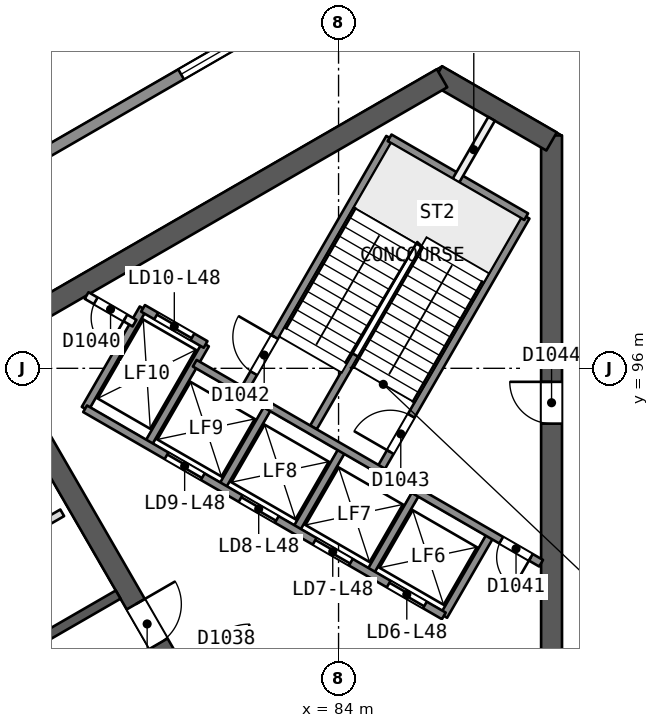
"""IFC4 building model, lengths in metres.
Left out: names, types, materials, properties, quantities, classifications, styles, units other than length and angle.
Written with IfcOpenShell. Run it as: python <this file> out.ifc"""

import sys

from ifc_helpers import new_model, si_unit, direction, frame, frame_2d, origin, place, context, subcontext, project, spatial, rectangle, extrude, element, fill, save


model = new_model("IFC4")
c1 = context("Model", 3, precision=1e-05, world=origin(), true_north=direction((0.0, 1.0)))
c2 = subcontext(c1, "Body", "Model", "MODEL_VIEW")
j1 = project(units=[si_unit("LENGTHUNIT", "METRE"), si_unit("PLANEANGLEUNIT", "RADIAN")], contexts=[c1])
p1 = place(None, origin())
s1 = spatial("IfcSite", under=j1, at=p1, CompositionType="ELEMENT")
p2 = place(p1, origin())
s2 = spatial("IfcBuilding", under=s1, at=p2, CompositionType="ELEMENT")
p3 = place(p2, frame((0.0, 0.0, 197.0)))
s3 = spatial("IfcBuildingStorey", under=s2, at=p3, CompositionType="ELEMENT", Elevation=197.0)
p4 = place(p3, frame((89.605, 88.069, 0.0), z_axis=(0.0, 0.0, 1.0), x_axis=(0.0, 1.0, 0.0)))
e1 = element("IfcWall", 1, at=p4, inside=s3, PredefinedType="SHEAR", context=c2, shape_type="SweptSolid", body=[
    extrude(rectangle(XDim=14.058, YDim=0.55, at=frame_2d((7.029, 0.0))), origin(), (0.0, 0.0, 1.0), 4.4),
])
p5 = place(p4, frame((6.475, 0.0, 0.0)))
e2 = element("IfcOpeningElement", 2, at=p5, cuts=e1, PredefinedType="OPENING", context=c2, shape_type="SweptSolid", body=[
    extrude(rectangle(XDim=1.1, YDim=2.1, at=frame_2d((0.55, 1.05))), frame((0.0, 0.286, 0.0), z_axis=(0.0, -1.0, 0.0), x_axis=(1.0, 0.0, 0.0)), (0.0, 0.0, 1.0), 0.571),
])
p6 = place(p3, frame((89.605, 101.969, 0.0), z_axis=(0.0, 0.0, 1.0), x_axis=(-0.865997833373, 0.500047750313, 0.0)))
e3 = element("IfcWall", 3, at=p6, inside=s3, PredefinedType="SHEAR", context=c2, shape_type="SweptSolid", body=[
    extrude(rectangle(XDim=3.487, YDim=0.55, at=frame_2d((1.743, 0.0))), origin(), (0.0, 0.0, 1.0), 4.4),
])
p7 = place(p3, frame((86.723, 103.633, 0.0), z_axis=(0.0, 0.0, 1.0), x_axis=(-0.866023530946, -0.500003243837, 0.0)))
e4 = element("IfcWall", 4, at=p7, inside=s3, PredefinedType="SHEAR", context=c2, shape_type="SweptSolid", body=[
    extrude(rectangle(XDim=14.175, YDim=0.55, at=frame_2d((7.087, 0.0))), origin(), (0.0, 0.0, 1.0), 4.4),
])
p8 = place(p3, frame((74.686, 96.683, 0.0), z_axis=(0.0, 0.0, 1.0), x_axis=(0.499997818338, -0.866026663364, 0.0)))
e5 = element("IfcWall", 5, at=p8, inside=s3, PredefinedType="SHEAR", context=c2, shape_type="SweptSolid", body=[
    extrude(rectangle(XDim=10.105, YDim=0.55, at=frame_2d((5.052, 0.0))), origin(), (0.0, 0.0, 1.0), 4.4),
])
p9 = place(p8, frame((7.955, 0.0, 0.0)))
e6 = element("IfcOpeningElement", 6, at=p9, cuts=e5, PredefinedType="OPENING", context=c2, shape_type="SweptSolid", body=[
    extrude(rectangle(XDim=1.2, YDim=2.1, at=frame_2d((0.6, 1.05))), frame((0.0, 0.286, 0.0), z_axis=(0.0, -1.0, 0.0), x_axis=(1.0, 0.0, 0.0)), (0.0, 0.0, 1.0), 0.571),
])
p10 = place(p3, frame((78.2, 90.046, 0.0), z_axis=(0.0, 0.0, 1.0), x_axis=(-0.866026492143, -0.499998114903, 0.0)))
e7 = element("IfcWall", 7, at=p10, inside=s3, PredefinedType="SHEAR", context=c2, shape_type="SweptSolid", body=[
    extrude(rectangle(XDim=15.588, YDim=0.25, at=frame_2d((7.794, 0.0))), origin(), (0.0, 0.0, 1.0), 3.95),
])
p11 = place(p10, frame((2.518, 0.0, 0.0)))
e8 = element("IfcOpeningElement", 8, at=p11, cuts=e7, PredefinedType="OPENING", context=c2, shape_type="SweptSolid", body=[
    extrude(rectangle(XDim=1.2, YDim=2.4, at=frame_2d((0.6, 1.2))), frame((0.0, 0.135, 0.0), z_axis=(0.0, -1.0, 0.0), x_axis=(1.0, 0.0, 0.0)), (0.0, 0.0, 1.0), 0.271),
])
p12 = place(p10, frame((7.194, 0.0, 0.0)))
e9 = element("IfcOpeningElement", 9, at=p12, cuts=e7, PredefinedType="OPENING", context=c2, shape_type="SweptSolid", body=[
    extrude(rectangle(XDim=1.2, YDim=2.4, at=frame_2d((0.6, 1.2))), frame((0.0, 0.135, 0.0), z_axis=(0.0, -1.0, 0.0), x_axis=(1.0, 0.0, 0.0)), (0.0, 0.0, 1.0), 0.271),
])
p13 = place(p10, frame((10.312, 0.0, 0.0)))
e10 = element("IfcOpeningElement", 10, at=p13, cuts=e7, PredefinedType="OPENING", context=c2, shape_type="SweptSolid", body=[
    extrude(rectangle(XDim=1.2, YDim=2.4, at=frame_2d((0.6, 1.2))), frame((0.0, 0.135, 0.0), z_axis=(0.0, -1.0, 0.0), x_axis=(1.0, 0.0, 0.0)), (0.0, 0.0, 1.0), 0.271),
])
p14 = place(p10, frame((13.43, 0.0, 0.0)))
e11 = element("IfcOpeningElement", 11, at=p14, cuts=e7, PredefinedType="OPENING", context=c2, shape_type="SweptSolid", body=[
    extrude(rectangle(XDim=1.2, YDim=2.4, at=frame_2d((0.6, 1.2))), frame((0.0, 0.135, 0.0), z_axis=(0.0, -1.0, 0.0), x_axis=(1.0, 0.0, 0.0)), (0.0, 0.0, 1.0), 0.271),
])
p15 = place(p3, frame((76.728, 92.198, 0.0), z_axis=(0.0, 0.0, 1.0), x_axis=(-0.866029326177, -0.499993206155, 0.0)))
e12 = element("IfcWall", 12, at=p15, inside=s3, PredefinedType="PARTITIONING", context=c2, shape_type="SweptSolid", body=[
    extrude(rectangle(XDim=6.036, YDim=0.2, at=frame_2d((3.018, 0.0))), origin(), (0.0, 0.0, 1.0), 3.95),
])
p16 = place(p15, frame((2.418, 0.0, 0.0)))
e13 = element("IfcOpeningElement", 13, at=p16, cuts=e12, PredefinedType="OPENING", context=c2, shape_type="SweptSolid", body=[
    extrude(rectangle(XDim=1.2, YDim=2.4, at=frame_2d((0.6, 1.2))), frame((0.0, 0.11, 0.0), z_axis=(0.0, -1.0, 0.0), x_axis=(1.0, 0.0, 0.0)), (0.0, 0.0, 1.0), 0.221),
])
p17 = place(p3, frame((43.362, 82.667, 0.0), z_axis=(0.0, 0.0, 1.0), x_axis=(0.866025243948, 0.500000276845, 0.0)))
e14 = element("IfcWall", 14, at=p17, inside=s3, PredefinedType="SOLIDWALL", context=c2, shape_type="SweptSolid", body=[
    extrude(rectangle(XDim=52.132, YDim=0.3, at=frame_2d((26.066, 0.0))), origin(), (0.0, 0.0, 1.0), 3.95),
])
p18 = place(p17, frame((8.193, 0.0, 0.9)))
e15 = element("IfcOpeningElement", 15, at=p18, cuts=e14, PredefinedType="OPENING", context=c2, shape_type="SweptSolid", body=[
    extrude(rectangle(XDim=1.8, YDim=1.5, at=frame_2d((0.9, 0.75))), frame((0.0, 0.161, 0.0), z_axis=(0.0, -1.0, 0.0), x_axis=(1.0, 0.0, 0.0)), (0.0, 0.0, 1.0), 0.321),
])
p19 = place(p17, frame((42.139, 0.0, 0.9)))
e16 = element("IfcOpeningElement", 16, at=p19, cuts=e14, PredefinedType="OPENING", context=c2, shape_type="SweptSolid", body=[
    extrude(rectangle(XDim=1.8, YDim=1.5, at=frame_2d((0.9, 0.75))), frame((0.0, 0.161, 0.0), z_axis=(0.0, -1.0, 0.0), x_axis=(1.0, 0.0, 0.0)), (0.0, 0.0, 1.0), 0.321),
])
p20 = place(p17, frame((3.713, 0.0, 0.6)))
e17 = element("IfcOpeningElement", 17, at=p20, cuts=e14, PredefinedType="OPENING", context=c2, shape_type="SweptSolid", body=[
    extrude(rectangle(XDim=3.0, YDim=2.4, at=frame_2d((1.5, 1.2))), frame((0.0, 0.161, 0.0), z_axis=(0.0, -1.0, 0.0), x_axis=(1.0, 0.0, 0.0)), (0.0, 0.0, 1.0), 0.321),
])
p21 = place(p17, frame((14.14, 0.0, 0.6)))
e18 = element("IfcOpeningElement", 18, at=p21, cuts=e14, PredefinedType="OPENING", context=c2, shape_type="SweptSolid", body=[
    extrude(rectangle(XDim=3.0, YDim=2.4, at=frame_2d((1.5, 1.2))), frame((0.0, 0.161, 0.0), z_axis=(0.0, -1.0, 0.0), x_axis=(1.0, 0.0, 0.0)), (0.0, 0.0, 1.0), 0.321),
])
p22 = place(p17, frame((24.566, 0.0, 0.6)))
e19 = element("IfcOpeningElement", 19, at=p22, cuts=e14, PredefinedType="OPENING", context=c2, shape_type="SweptSolid", body=[
    extrude(rectangle(XDim=3.0, YDim=2.4, at=frame_2d((1.5, 1.2))), frame((0.0, 0.161, 0.0), z_axis=(0.0, -1.0, 0.0), x_axis=(1.0, 0.0, 0.0)), (0.0, 0.0, 1.0), 0.321),
])
p23 = place(p17, frame((34.992, 0.0, 0.6)))
e20 = element("IfcOpeningElement", 20, at=p23, cuts=e14, PredefinedType="OPENING", context=c2, shape_type="SweptSolid", body=[
    extrude(rectangle(XDim=3.0, YDim=2.4, at=frame_2d((1.5, 1.2))), frame((0.0, 0.161, 0.0), z_axis=(0.0, -1.0, 0.0), x_axis=(1.0, 0.0, 0.0)), (0.0, 0.0, 1.0), 0.321),
])
p24 = place(p17, frame((45.419, 0.0, 0.6)))
e21 = element("IfcOpeningElement", 21, at=p24, cuts=e14, PredefinedType="OPENING", context=c2, shape_type="SweptSolid", body=[
    extrude(rectangle(XDim=3.0, YDim=2.4, at=frame_2d((1.5, 1.2))), frame((0.0, 0.161, 0.0), z_axis=(0.0, -1.0, 0.0), x_axis=(1.0, 0.0, 0.0)), (0.0, 0.0, 1.0), 0.321),
])
for number, where, z_axis, x_axis in (
    (22, (86.77, 89.486, 0.0), (0.0, 0.0, 1.0), (0.5, 0.866, 0.0)),
    (23, (84.821, 90.611, 0.0), (0.0, 0.0, 1.0), (0.5, 0.866, 0.0)),
):
    element("IfcWall", number, at=place(p3, frame(where, z_axis=z_axis, x_axis=x_axis)), inside=s3, PredefinedType="SOLIDWALL", context=c2, shape_type="SweptSolid", body=[
        extrude(rectangle(XDim=2.48, YDim=0.2, at=frame_2d((1.24, 0.0))), origin(), (0.0, 0.0, 1.0), 3.95),
    ])
p25 = place(p3, frame((85.087, 93.321, 0.0), z_axis=(0.0, 0.0, 1.0), x_axis=(0.500019787375, 0.866013979237, 0.0)))
e24 = element("IfcWall", 24, at=p25, inside=s3, PredefinedType="SOLIDWALL", context=c2, shape_type="SweptSolid", body=[
    extrude(rectangle(XDim=7.7, YDim=0.2, at=frame_2d((3.85, 0.0))), origin(), (0.0, 0.0, 1.0), 3.95),
])
p26 = place(p25, frame((0.55, 0.0, 0.0)))
e25 = element("IfcOpeningElement", 25, at=p26, cuts=e24, PredefinedType="OPENING", context=c2, shape_type="SweptSolid", body=[
    extrude(rectangle(XDim=1.1, YDim=2.1, at=frame_2d((0.55, 1.05))), frame((0.0, 0.11, 0.0), z_axis=(0.0, -1.0, 0.0), x_axis=(1.0, 0.0, 0.0)), (0.0, 0.0, 1.0), 0.221),
])
p27 = place(p3, frame((82.873, 91.736, 0.0), z_axis=(0.0, 0.0, 1.0), x_axis=(0.499961042966, 0.86604789447, 0.0)))
e26 = element("IfcWall", 26, at=p27, inside=s3, PredefinedType="SOLIDWALL", context=c2, shape_type="SweptSolid", body=[
    extrude(rectangle(XDim=2.48, YDim=0.2, at=frame_2d((1.24, 0.0))), origin(), (0.0, 0.0, 1.0), 3.95),
])
p28 = place(p3, frame((83.34, 94.445, 0.0), z_axis=(0.0, 0.0, 1.0), x_axis=(0.499946605688, 0.86605622881, 0.0)))
e27 = element("IfcWall", 27, at=p28, inside=s3, PredefinedType="SOLIDWALL", context=c2, shape_type="SweptSolid", body=[
    extrude(rectangle(XDim=2.2, YDim=0.2, at=frame_2d((1.1, 0.0))), origin(), (0.0, 0.0, 1.0), 3.95),
])
p29 = place(p3, frame((87.09, 100.94, 0.0), z_axis=(0.0, 0.0, 1.0), x_axis=(0.499951854219, 0.86605319898, 0.0)))
e28 = element("IfcWall", 28, at=p29, inside=s3, PredefinedType="PARTITIONING", context=c2, shape_type="SweptSolid", body=[
    extrude(rectangle(XDim=1.873, YDim=0.2, at=frame_2d((0.937, 0.0))), origin(), (0.0, 0.0, 1.0), 3.95),
])
p30 = place(p3, frame((80.924, 92.861, 0.0), z_axis=(0.0, 0.0, 1.0), x_axis=(0.499961042966, 0.86604789447, 0.0)))
e29 = element("IfcWall", 29, at=p30, inside=s3, PredefinedType="SOLIDWALL", context=c2, shape_type="SweptSolid", body=[
    extrude(rectangle(XDim=2.48, YDim=0.2, at=frame_2d((1.24, 0.0))), origin(), (0.0, 0.0, 1.0), 3.95),
])
p31 = place(p3, frame((81.493, 95.396, 0.0), z_axis=(0.0, 0.0, 1.0), x_axis=(0.500006057782, 0.866021906294, 0.0)))
e30 = element("IfcWall", 30, at=p31, inside=s3, PredefinedType="SOLIDWALL", context=c2, shape_type="SweptSolid", body=[
    extrude(rectangle(XDim=7.7, YDim=0.2, at=frame_2d((3.85, 0.0))), origin(), (0.0, 0.0, 1.0), 3.95),
])
p32 = place(p31, frame((0.55, 0.0, 0.0)))
e31 = element("IfcOpeningElement", 31, at=p32, cuts=e30, PredefinedType="OPENING", context=c2, shape_type="SweptSolid", body=[
    extrude(rectangle(XDim=1.1, YDim=2.1, at=frame_2d((0.55, 1.05))), frame((0.0, 0.11, 0.0), z_axis=(0.0, -1.0, 0.0), x_axis=(1.0, 0.0, 0.0)), (0.0, 0.0, 1.0), 0.221),
])
for number, where, z_axis, x_axis in (
    (32, (78.976, 93.986, 0.0), (0.0, 0.0, 1.0), (0.5, 0.866, 0.0)),
    (33, (77.33, 94.936, 0.0), (0.0, 0.0, 1.0), (0.5, 0.866, 0.0)),
):
    element("IfcWall", number, at=place(p3, frame(where, z_axis=z_axis, x_axis=x_axis)), inside=s3, PredefinedType="SOLIDWALL", context=c2, shape_type="SweptSolid", body=[
        extrude(rectangle(XDim=3.05, YDim=0.2, at=frame_2d((1.525, 0.0))), origin(), (0.0, 0.0, 1.0), 3.95),
    ])
p33 = place(p3, frame((86.77, 89.486, 0.0), z_axis=(0.0, 0.0, 1.0), x_axis=(-0.86601811187, 0.500012629753, 0.0)))
e34 = element("IfcWall", 34, at=p33, inside=s3, PredefinedType="SOLIDWALL", context=c2, shape_type="SweptSolid", body=[
    extrude(rectangle(XDim=10.9, YDim=0.2, at=frame_2d((5.45, 0.0))), origin(), (0.0, 0.0, 1.0), 3.95),
])
p34 = place(p33, frame((0.575, 0.0, 0.0)))
e35 = element("IfcOpeningElement", 35, at=p34, cuts=e34, PredefinedType="OPENING", context=c2, shape_type="SweptSolid", body=[
    extrude(rectangle(XDim=1.1, YDim=2.1, at=frame_2d((0.55, 1.05))), frame((0.0, 0.11, 0.0), z_axis=(0.0, -1.0, 0.0), x_axis=(1.0, 0.0, 0.0)), (0.0, 0.0, 1.0), 0.221),
])
p35 = place(p33, frame((2.825, 0.0, 0.0)))
e36 = element("IfcOpeningElement", 36, at=p35, cuts=e34, PredefinedType="OPENING", context=c2, shape_type="SweptSolid", body=[
    extrude(rectangle(XDim=1.1, YDim=2.1, at=frame_2d((0.55, 1.05))), frame((0.0, 0.11, 0.0), z_axis=(0.0, -1.0, 0.0), x_axis=(1.0, 0.0, 0.0)), (0.0, 0.0, 1.0), 0.221),
])
p36 = place(p33, frame((5.075, 0.0, 0.0)))
e37 = element("IfcOpeningElement", 37, at=p36, cuts=e34, PredefinedType="OPENING", context=c2, shape_type="SweptSolid", body=[
    extrude(rectangle(XDim=1.1, YDim=2.1, at=frame_2d((0.55, 1.05))), frame((0.0, 0.11, 0.0), z_axis=(0.0, -1.0, 0.0), x_axis=(1.0, 0.0, 0.0)), (0.0, 0.0, 1.0), 0.221),
])
p37 = place(p33, frame((7.325, 0.0, 0.0)))
e38 = element("IfcOpeningElement", 38, at=p37, cuts=e34, PredefinedType="OPENING", context=c2, shape_type="SweptSolid", body=[
    extrude(rectangle(XDim=1.1, YDim=2.1, at=frame_2d((0.55, 1.05))), frame((0.0, 0.11, 0.0), z_axis=(0.0, -1.0, 0.0), x_axis=(1.0, 0.0, 0.0)), (0.0, 0.0, 1.0), 0.221),
])
p38 = place(p3, frame((89.33, 90.872, 0.0), z_axis=(0.0, 0.0, 1.0), x_axis=(-0.866027589512, 0.49999621419, 0.0)))
e39 = element("IfcWall", 39, at=p38, inside=s3, PredefinedType="SOLIDWALL", context=c2, shape_type="SweptSolid", body=[
    extrude(rectangle(XDim=10.524, YDim=0.2, at=frame_2d((5.262, 0.0))), origin(), (0.0, 0.0, 1.0), 3.95),
])
p39 = place(p38, frame((0.312, 0.0, 0.0)))
e40 = element("IfcOpeningElement", 40, at=p39, cuts=e39, PredefinedType="OPENING", context=c2, shape_type="SweptSolid", body=[
    extrude(rectangle(XDim=0.9, YDim=2.1, at=frame_2d((0.45, 1.05))), frame((0.0, 0.11, 0.0), z_axis=(0.0, -1.0, 0.0), x_axis=(1.0, 0.0, 0.0)), (0.0, 0.0, 1.0), 0.221),
])
p40 = place(p3, frame((78.63, 97.188, 0.0), z_axis=(0.0, 0.0, 1.0), x_axis=(-0.866003949776, 0.500037157592, 0.0)))
e41 = element("IfcWall", 41, at=p40, inside=s3, PredefinedType="PARTITIONING", context=c2, shape_type="SweptSolid", body=[
    extrude(rectangle(XDim=1.455, YDim=0.2, at=frame_2d((0.728, 0.0))), origin(), (0.0, 0.0, 1.0), 3.95),
])
p41 = place(p40, frame((0.278, 0.0, 0.0)))
e42 = element("IfcOpeningElement", 42, at=p41, cuts=e41, PredefinedType="OPENING", context=c2, shape_type="SweptSolid", body=[
    extrude(rectangle(XDim=0.9, YDim=2.1, at=frame_2d((0.45, 1.05))), frame((0.0, 0.11, 0.0), z_axis=(0.0, -1.0, 0.0), x_axis=(1.0, 0.0, 0.0)), (0.0, 0.0, 1.0), 0.221),
])
p42 = place(p3, frame((80.5, 96.627, 0.0), z_axis=(0.0, 0.0, 1.0), x_axis=(-0.86601224135, 0.500022797313, 0.0)))
e43 = element("IfcWall", 43, at=p42, inside=s3, PredefinedType="SOLIDWALL", context=c2, shape_type="SweptSolid", body=[
    extrude(rectangle(XDim=1.9, YDim=0.2, at=frame_2d((0.95, 0.0))), origin(), (0.0, 0.0, 1.0), 3.95),
])
p43 = place(p42, frame((0.4, 0.0, 0.0)))
e44 = element("IfcOpeningElement", 44, at=p43, cuts=e43, PredefinedType="OPENING", context=c2, shape_type="SweptSolid", body=[
    extrude(rectangle(XDim=1.1, YDim=2.1, at=frame_2d((0.55, 1.05))), frame((0.0, 0.11, 0.0), z_axis=(0.0, -1.0, 0.0), x_axis=(1.0, 0.0, 0.0)), (0.0, 0.0, 1.0), 0.221),
])
p44 = place(p3, frame((88.937, 99.99, 0.0), z_axis=(0.0, 0.0, 1.0), x_axis=(-0.866004344652, 0.500036473714, 0.0)))
e45 = element("IfcWall", 45, at=p44, inside=s3, PredefinedType="SOLIDWALL", context=c2, shape_type="SweptSolid", body=[
    extrude(rectangle(XDim=4.15, YDim=0.2, at=frame_2d((2.075, 0.0))), origin(), (0.0, 0.0, 1.0), 3.95),
])
p45 = place(p19, origin())
e46 = element("IfcWindow", 46, at=p45, inside=s3, PartitioningType="SINGLE_PANEL", PredefinedType="WINDOW", context=c2, shape_type="SweptSolid", body=[
    extrude(rectangle(XDim=1.8, YDim=1.5, at=frame_2d((0.9, 0.75))), frame((0.0, 0.03, 0.0), z_axis=(0.0, -1.0, 0.0), x_axis=(1.0, 0.0, 0.0)), (0.0, 0.0, 1.0), 0.06),
])
fill(e16, e46)
p46 = place(p9, origin())
e47 = element("IfcDoor", 47, at=p46, inside=s3, OperationType="SINGLE_SWING_LEFT", PredefinedType="NOTDEFINED", context=c2, shape_type="SweptSolid", body=[
    extrude(rectangle(XDim=1.2, YDim=2.1, at=frame_2d((0.6, 1.05))), frame((0.0, 0.025, 0.0), z_axis=(0.0, -1.0, 0.0), x_axis=(1.0, 0.0, 0.0)), (0.0, 0.0, 1.0), 0.05),
])
fill(e6, e47)
p47 = place(p34, origin())
e48 = element("IfcDoor", 48, at=p47, inside=s3, OperationType="SLIDING_TO_RIGHT", PredefinedType="NOTDEFINED", context=c2, shape_type="SweptSolid", body=[
    extrude(rectangle(XDim=1.1, YDim=2.1, at=frame_2d((0.55, 1.05))), frame((0.0, 0.025, 0.0), z_axis=(0.0, -1.0, 0.0), x_axis=(1.0, 0.0, 0.0)), (0.0, 0.0, 1.0), 0.05),
])
fill(e35, e48)
p48 = place(p35, origin())
e49 = element("IfcDoor", 49, at=p48, inside=s3, OperationType="SLIDING_TO_LEFT", PredefinedType="NOTDEFINED", context=c2, shape_type="SweptSolid", body=[
    extrude(rectangle(XDim=1.1, YDim=2.1, at=frame_2d((0.55, 1.05))), frame((0.0, 0.025, 0.0), z_axis=(0.0, -1.0, 0.0), x_axis=(1.0, 0.0, 0.0)), (0.0, 0.0, 1.0), 0.05),
])
fill(e36, e49)
p49 = place(p36, origin())
e50 = element("IfcDoor", 50, at=p49, inside=s3, OperationType="SLIDING_TO_RIGHT", PredefinedType="NOTDEFINED", context=c2, shape_type="SweptSolid", body=[
    extrude(rectangle(XDim=1.1, YDim=2.1, at=frame_2d((0.55, 1.05))), frame((0.0, 0.025, 0.0), z_axis=(0.0, -1.0, 0.0), x_axis=(1.0, 0.0, 0.0)), (0.0, 0.0, 1.0), 0.05),
])
fill(e37, e50)
p50 = place(p37, origin())
e51 = element("IfcDoor", 51, at=p50, inside=s3, OperationType="SLIDING_TO_LEFT", PredefinedType="NOTDEFINED", context=c2, shape_type="SweptSolid", body=[
    extrude(rectangle(XDim=1.1, YDim=2.1, at=frame_2d((0.55, 1.05))), frame((0.0, 0.025, 0.0), z_axis=(0.0, -1.0, 0.0), x_axis=(1.0, 0.0, 0.0)), (0.0, 0.0, 1.0), 0.05),
])
fill(e38, e51)
p51 = place(p43, origin())
e52 = element("IfcDoor", 52, at=p51, inside=s3, OperationType="SLIDING_TO_RIGHT", PredefinedType="NOTDEFINED", context=c2, shape_type="SweptSolid", body=[
    extrude(rectangle(XDim=1.1, YDim=2.1, at=frame_2d((0.55, 1.05))), frame((0.0, 0.025, 0.0), z_axis=(0.0, -1.0, 0.0), x_axis=(1.0, 0.0, 0.0)), (0.0, 0.0, 1.0), 0.05),
])
fill(e44, e52)
p52 = place(p41, origin())
e53 = element("IfcDoor", 53, at=p52, inside=s3, OperationType="SINGLE_SWING_LEFT", PredefinedType="NOTDEFINED", context=c2, shape_type="SweptSolid", body=[
    extrude(rectangle(XDim=0.9, YDim=2.1, at=frame_2d((0.45, 1.05))), frame((0.0, 0.025, 0.0), z_axis=(0.0, -1.0, 0.0), x_axis=(1.0, 0.0, 0.0)), (0.0, 0.0, 1.0), 0.05),
])
fill(e42, e53)
p53 = place(p39, origin())
e54 = element("IfcDoor", 54, at=p53, inside=s3, OperationType="SINGLE_SWING_LEFT", PredefinedType="NOTDEFINED", context=c2, shape_type="SweptSolid", body=[
    extrude(rectangle(XDim=0.9, YDim=2.1, at=frame_2d((0.45, 1.05))), frame((0.0, 0.025, 0.0), z_axis=(0.0, -1.0, 0.0), x_axis=(1.0, 0.0, 0.0)), (0.0, 0.0, 1.0), 0.05),
])
fill(e40, e54)
p54 = place(p32, origin())
e55 = element("IfcDoor", 55, at=p54, inside=s3, OperationType="SINGLE_SWING_RIGHT", PredefinedType="NOTDEFINED", context=c2, shape_type="SweptSolid", body=[
    extrude(rectangle(XDim=1.1, YDim=2.1, at=frame_2d((0.55, 1.05))), frame((0.0, 0.025, 0.0), z_axis=(0.0, -1.0, 0.0), x_axis=(1.0, 0.0, 0.0)), (0.0, 0.0, 1.0), 0.05),
])
fill(e31, e55)
p55 = place(p26, origin())
e56 = element("IfcDoor", 56, at=p55, inside=s3, OperationType="SINGLE_SWING_LEFT", PredefinedType="NOTDEFINED", context=c2, shape_type="SweptSolid", body=[
    extrude(rectangle(XDim=1.1, YDim=2.1, at=frame_2d((0.55, 1.05))), frame((0.0, 0.025, 0.0), z_axis=(0.0, -1.0, 0.0), x_axis=(1.0, 0.0, 0.0)), (0.0, 0.0, 1.0), 0.05),
])
fill(e25, e56)
p56 = place(p5, origin())
e57 = element("IfcDoor", 57, at=p56, inside=s3, OperationType="SINGLE_SWING_RIGHT", PredefinedType="NOTDEFINED", context=c2, shape_type="SweptSolid", body=[
    extrude(rectangle(XDim=1.1, YDim=2.1, at=frame_2d((0.55, 1.05))), frame((0.0, 0.025, 0.0), z_axis=(0.0, -1.0, 0.0), x_axis=(1.0, 0.0, 0.0)), (0.0, 0.0, 1.0), 0.05),
])
fill(e2, e57)
save(model, sys.argv[1])
